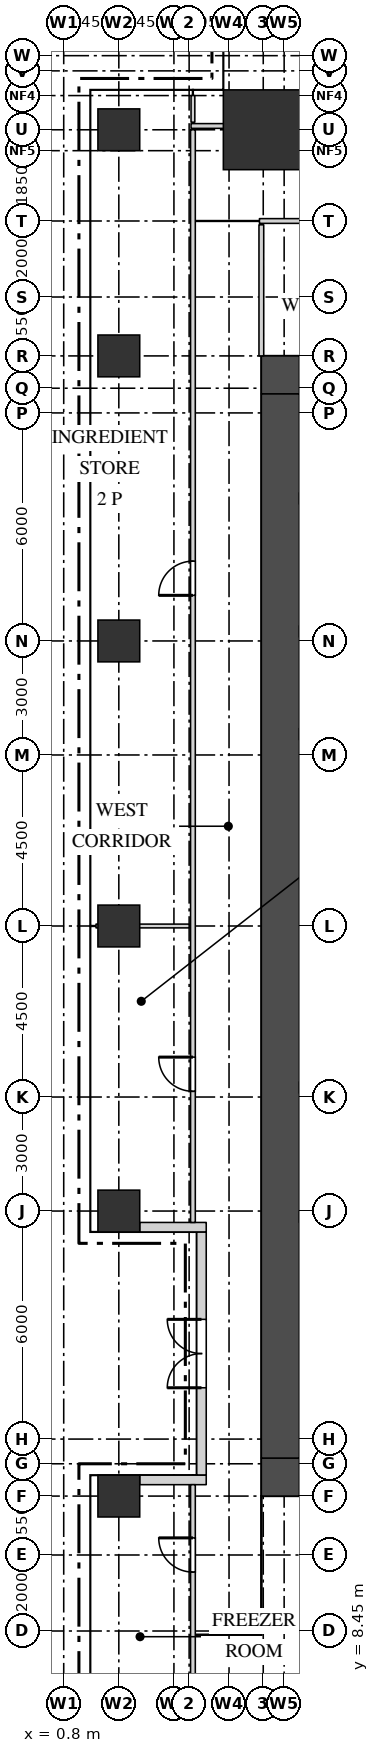
"""IFC4 building model, lengths in metres.
Left out: names, types, materials, properties, quantities, classifications, styles, units other than length and angle.
Written with IfcOpenShell. Run it as: python <this file> out.ifc"""

import sys

from ifc_helpers import new_model, si_unit, direction, frame, frame_2d, origin, origin_2d, place, context, subcontext, project, spatial, rectangle, extrude, source, transform, mapped, element, fill, save


model = new_model("IFC4")
c1 = context("Model", 3, precision=1e-05, world=origin(), true_north=direction((0.0, 1.0)))
c2 = subcontext(c1, "Body", "Model", "MODEL_VIEW")
j1 = project(units=[si_unit("LENGTHUNIT", "METRE"), si_unit("PLANEANGLEUNIT", "RADIAN")], contexts=[c1])
p1 = place(None, origin())
s1 = spatial("IfcSite", under=j1, at=p1, CompositionType="ELEMENT")
p2 = place(p1, origin())
s2 = spatial("IfcBuilding", under=s1, at=p2, CompositionType="ELEMENT")
p3 = place(p2, frame((0.0, 0.0, 114.7)))
s3 = spatial("IfcBuildingStorey", under=s2, at=p3, CompositionType="ELEMENT", Elevation=114.7)
m1 = source(origin(), c2, "Body", "SweptSolid", [
    extrude(rectangle(XDim=1.0, YDim=1.0, at=frame_2d((0.5, 0.0))), origin(), (0.0, 0.0, 1.0), 4.1),
])
for number, where, z_axis, x_axis in (
    (1, (6.0, 41.5, 0.0), (0.0, 0.0, 1.0), (1.0, 0.0, 0.0)),
    (2, (6.0, 12.5, 0.0), (0.0, 0.0, 1.0), (1.0, 0.0, 0.0)),
):
    element("IfcWall", number, at=place(p3, frame(where, z_axis=z_axis, x_axis=x_axis)), inside=s3, PredefinedType="SHEAR", context=c2, shape_type="MappedRepresentation", body=[
        mapped(m1, transform((0.0, 0.0, 0.0))),
    ])
m2 = source(origin(), c2, "Body", "SweptSolid", [
    extrude(rectangle(XDim=28.0, YDim=1.0, at=frame_2d((14.0, 0.0))), origin(), (0.0, 0.0, 1.0), 4.1),
])
p4 = place(p3, frame((6.5, 13.0, 0.0), z_axis=(0.0, 0.0, 1.0), x_axis=(0.0, 1.0, 0.0)))
e3 = element("IfcWall", 3, at=p4, inside=s3, PredefinedType="SHEAR", context=c2, shape_type="MappedRepresentation", body=[
    mapped(m2, transform((0.0, 0.0, 0.0))),
])
m3 = source(origin(), c2, "Body", "SweptSolid", [
    extrude(rectangle(XDim=2.1, YDim=2.1, at=origin_2d()), origin(), (0.0, 0.0, 1.0), 4.4),
])
p5 = place(p3, frame((6.05, 47.95, 0.0), z_axis=(0.0, 0.0, 1.0), x_axis=(1.0, 0.0, 0.0)))
e4 = element("IfcColumn", 4, at=p5, inside=s3, PredefinedType="COLUMN", context=c2, shape_type="MappedRepresentation", body=[
    mapped(m3, transform((0.0, 0.0, 0.0))),
])
m4 = source(origin(), c2, "Body", "SweptSolid", [
    extrude(rectangle(XDim=1.1, YDim=1.1, at=origin_2d()), origin(), (0.0, 0.0, 1.0), 4.1),
])
for number, where, z_axis, x_axis in (
    (5, (2.25, 12.0, 0.0), (0.0, 0.0, 1.0), (1.0, 0.0, 0.0)),
    (6, (2.25, 19.5, 0.0), (0.0, 0.0, 1.0), (1.0, 0.0, 0.0)),
    (7, (2.25, 27.0, 0.0), (0.0, 0.0, 1.0), (1.0, 0.0, 0.0)),
    (8, (2.25, 34.5, 0.0), (0.0, 0.0, 1.0), (1.0, 0.0, 0.0)),
    (9, (2.25, 42.0, 0.0), (0.0, 0.0, 1.0), (1.0, 0.0, 0.0)),
    (10, (2.25, 47.95, 0.0), (0.0, 0.0, 1.0), (1.0, 0.0, 0.0)),
):
    element("IfcColumn", number, at=place(p3, frame(where, z_axis=z_axis, x_axis=x_axis)), inside=s3, PredefinedType="COLUMN", context=c2, shape_type="MappedRepresentation", body=[
        mapped(m4, transform((0.0, 0.0, 0.0))),
    ])
m5 = source(origin(), c2, "Body", "SweptSolid", [
    extrude(rectangle(XDim=6.4, YDim=0.25, at=frame_2d((3.2, 0.0))), origin(), (0.0, 0.0, 1.0), 3.5),
])
p6 = place(p3, frame((4.425, 12.55, 0.0), z_axis=(0.0, 0.0, 1.0), x_axis=(0.0, 1.0, 0.0)))
e11 = element("IfcWall", 11, at=p6, inside=s3, PredefinedType="SOLIDWALL", context=c2, shape_type="MappedRepresentation", body=[
    mapped(m5, transform((0.0, 0.0, 0.0))),
])
m6 = source(origin(), c2, "Body", "SweptSolid", [
    extrude(rectangle(XDim=1.65, YDim=2.4, at=frame_2d((0.825, 1.2))), frame((0.0, 0.135, 0.0), z_axis=(0.0, -1.0, 0.0), x_axis=(1.0, 0.0, 0.0)), (0.0, 0.0, 1.0), 0.27),
])
p7 = place(p6, frame((0.35, 0.0, 0.0)))
e12 = element("IfcOpeningElement", 12, at=p7, cuts=e11, PredefinedType="OPENING", context=c2, shape_type="MappedRepresentation", body=[
    mapped(m6, transform((0.0, 0.0, 0.0))),
])
p8 = place(p6, frame((4.4, 0.0, 0.0)))
e13 = element("IfcOpeningElement", 13, at=p8, cuts=e11, PredefinedType="OPENING", context=c2, shape_type="MappedRepresentation", body=[
    mapped(m6, transform((0.0, 0.0, 0.0))),
])
m7 = source(origin(), c2, "Body", "SweptSolid", [
    extrude(rectangle(XDim=1.8, YDim=2.4, at=frame_2d((0.9, 1.2))), frame((0.0, 0.135, 0.0), z_axis=(0.0, -1.0, 0.0), x_axis=(1.0, 0.0, 0.0)), (0.0, 0.0, 1.0), 0.27),
])
p9 = place(p6, frame((2.3, 0.0, 0.0)))
e14 = element("IfcOpeningElement", 14, at=p9, cuts=e11, PredefinedType="OPENING", context=c2, shape_type="MappedRepresentation", body=[
    mapped(m7, transform((0.0, 0.0, 0.0))),
])
m8 = source(origin(), c2, "Body", "SweptSolid", [
    extrude(rectangle(XDim=1.75, YDim=0.25, at=frame_2d((0.875, 0.0))), origin(), (0.0, 0.0, 1.0), 3.5),
])
for number, where, z_axis, x_axis in (
    (15, (2.8, 12.425, 0.0), (0.0, 0.0, 1.0), (1.0, 0.0, 0.0)),
    (16, (2.8, 19.075, 0.0), (0.0, 0.0, 1.0), (1.0, 0.0, 0.0)),
):
    element("IfcWall", number, at=place(p3, frame(where, z_axis=z_axis, x_axis=x_axis)), inside=s3, PredefinedType="SOLIDWALL", context=c2, shape_type="MappedRepresentation", body=[
        mapped(m8, transform((0.0, 0.0, 0.0))),
    ])
m9 = source(origin(), c2, "Body", "SweptSolid", [
    extrude(rectangle(XDim=6.15, YDim=0.125, at=frame_2d((3.075, 0.0))), origin(), (0.0, 0.0, 1.0), 4.2),
])
p10 = place(p3, frame((4.2, 6.15, 0.0), z_axis=(0.0, 0.0, 1.0), x_axis=(0.0, 1.0, 0.0)))
e17 = element("IfcWall", 17, at=p10, inside=s3, PredefinedType="PARTITIONING", context=c2, shape_type="MappedRepresentation", body=[
    mapped(m9, transform((0.0, 0.0, 0.0))),
])
m10 = source(origin(), c2, "Body", "SweptSolid", [
    extrude(rectangle(XDim=0.9, YDim=2.1, at=frame_2d((0.45, 1.05))), frame((0.0, 0.073, 0.0), z_axis=(0.0, -1.0, 0.0), x_axis=(1.0, 0.0, 0.0)), (0.0, 0.0, 1.0), 0.145),
])
p11 = place(p10, frame((3.85, 0.0, 0.0)))
e18 = element("IfcOpeningElement", 18, at=p11, cuts=e17, PredefinedType="OPENING", context=c2, shape_type="MappedRepresentation", body=[
    mapped(m10, transform((0.0, 0.0, 0.0))),
])
m11 = source(origin(), c2, "Body", "SweptSolid", [
    extrude(rectangle(XDim=28.75, YDim=0.125, at=frame_2d((14.375, 0.0))), origin(), (0.0, 0.0, 1.0), 4.2),
])
p12 = place(p3, frame((4.2, 19.2, 0.0), z_axis=(0.0, 0.0, 1.0), x_axis=(0.0, 1.0, 0.0)))
e19 = element("IfcWall", 19, at=p12, inside=s3, PredefinedType="PARTITIONING", context=c2, shape_type="MappedRepresentation", body=[
    mapped(m11, transform((0.0, 0.0, 0.0))),
])
p13 = place(p12, frame((3.45, 0.0, 0.0)))
e20 = element("IfcOpeningElement", 20, at=p13, cuts=e19, PredefinedType="OPENING", context=c2, shape_type="MappedRepresentation", body=[
    mapped(m10, transform((0.0, 0.0, 0.0))),
])
p14 = place(p12, frame((16.5, 0.0, 0.0)))
e21 = element("IfcOpeningElement", 21, at=p14, cuts=e19, PredefinedType="OPENING", context=c2, shape_type="MappedRepresentation", body=[
    mapped(m10, transform((0.0, 0.0, 0.0))),
])
m12 = source(origin(), c2, "Body", "SweptSolid", [
    extrude(rectangle(XDim=2.45, YDim=0.1, at=frame_2d((1.225, 0.0))), origin(), (0.0, 0.0, 1.0), 4.2),
])
p15 = place(p3, frame((1.65, 27.0, 0.0), z_axis=(0.0, 0.0, 1.0), x_axis=(1.0, 0.0, 0.0)))
e22 = element("IfcWall", 22, at=p15, inside=s3, PredefinedType="PARTITIONING", context=c2, shape_type="MappedRepresentation", body=[
    mapped(m12, transform((0.0, 0.0, 0.0))),
])
m13 = source(origin(), c2, "Body", "SweptSolid", [
    extrude(rectangle(XDim=3.45, YDim=0.125, at=frame_2d((1.725, 0.0))), origin(), (0.0, 0.0, 1.0), 4.2),
])
p16 = place(p3, frame((6.0, 42.0, 0.0), z_axis=(0.0, 0.0, 1.0), x_axis=(0.0, 1.0, 0.0)))
e23 = element("IfcWall", 23, at=p16, inside=s3, PredefinedType="PARTITIONING", context=c2, shape_type="MappedRepresentation", body=[
    mapped(m13, transform((0.0, 0.0, 0.0))),
])
m14 = source(origin(), c2, "Body", "SweptSolid", [
    extrude(rectangle(XDim=7.95, YDim=0.125, at=frame_2d((3.975, 0.0))), origin(), (0.0, 0.0, 1.0), 4.2),
])
p17 = place(p3, frame((5.95, 45.55, 0.0), z_axis=(0.0, 0.0, 1.0), x_axis=(1.0, 0.0, 0.0)))
e24 = element("IfcWall", 24, at=p17, inside=s3, PredefinedType="PARTITIONING", context=c2, shape_type="MappedRepresentation", body=[
    mapped(m14, transform((0.0, 0.0, 0.0))),
])
p18 = place(p17, frame((1.55, 0.0, 0.0)))
e25 = element("IfcOpeningElement", 25, at=p18, cuts=e24, PredefinedType="OPENING", context=c2, shape_type="MappedRepresentation", body=[
    mapped(m10, transform((0.0, 0.0, 0.0))),
])
p19 = place(p17, frame((5.65, 0.0, 0.0)))
e26 = element("IfcOpeningElement", 26, at=p19, cuts=e24, PredefinedType="OPENING", context=c2, shape_type="MappedRepresentation", body=[
    mapped(m10, transform((0.0, 0.0, 0.0))),
])
m15 = source(origin(), c2, "Body", "SweptSolid", [
    extrude(rectangle(XDim=42.2, YDim=0.125, at=frame_2d((21.1, 0.0))), origin(), (0.0, 0.0, 1.0), 3.55),
])
p20 = place(p3, frame((4.15, 48.05, 0.0), z_axis=(0.0, 0.0, 1.0), x_axis=(1.0, 0.0, 0.0)))
e27 = element("IfcWall", 27, at=p20, inside=s3, PredefinedType="PARTITIONING", context=c2, shape_type="MappedRepresentation", body=[
    mapped(m15, transform((0.0, 0.0, 0.0))),
])
p21 = place(p20, frame((7.25, 0.0, 0.0)))
e28 = element("IfcOpeningElement", 28, at=p21, cuts=e27, PredefinedType="OPENING", context=c2, shape_type="MappedRepresentation", body=[
    mapped(m10, transform((0.0, 0.0, 0.0))),
])
p22 = place(p20, frame((22.55, 0.0, 0.0)))
e29 = element("IfcOpeningElement", 29, at=p22, cuts=e27, PredefinedType="OPENING", context=c2, shape_type="MappedRepresentation", body=[
    mapped(m10, transform((0.0, 0.0, 0.0))),
])
p23 = place(p20, frame((35.85, 0.0, 0.0)))
e30 = element("IfcOpeningElement", 30, at=p23, cuts=e27, PredefinedType="OPENING", context=c2, shape_type="MappedRepresentation", body=[
    mapped(m10, transform((0.0, 0.0, 0.0))),
])
m16 = source(origin(), c2, "Body", "SweptSolid", [
    extrude(rectangle(XDim=0.7, YDim=0.1, at=frame_2d((0.35, 0.0))), origin(), (0.0, 0.0, 1.0), 4.2),
])
p24 = place(p3, frame((4.2, 48.15, 0.0), z_axis=(0.0, 0.0, 1.0), x_axis=(0.0, 1.0, 0.0)))
e31 = element("IfcWall", 31, at=p24, inside=s3, PredefinedType="PARTITIONING", context=c2, shape_type="MappedRepresentation", body=[
    mapped(m16, transform((0.0, 0.0, 0.0))),
])
m17 = source(origin(), c2, "Body", "SweptSolid", [
    extrude(rectangle(XDim=1.65, YDim=2.4, at=frame_2d((0.825, 1.2))), frame((0.0, 0.03, 0.0), z_axis=(0.0, -1.0, 0.0), x_axis=(1.0, 0.0, 0.0)), (0.0, 0.0, 1.0), 0.06),
])
p25 = place(p7, origin())
e32 = element("IfcWindow", 32, at=p25, inside=s3, PartitioningType="SINGLE_PANEL", PredefinedType="WINDOW", context=c2, shape_type="MappedRepresentation", body=[
    mapped(m17, transform((0.0, 0.0, 0.0))),
])
fill(e12, e32)
p26 = place(p8, origin())
e33 = element("IfcWindow", 33, at=p26, inside=s3, PartitioningType="SINGLE_PANEL", PredefinedType="WINDOW", context=c2, shape_type="MappedRepresentation", body=[
    mapped(m17, transform((0.0, 0.0, 0.0))),
])
fill(e13, e33)
m18 = source(origin(), c2, "Body", "SweptSolid", [
    extrude(rectangle(XDim=1.8, YDim=2.4, at=frame_2d((0.9, 1.2))), frame((0.0, 0.025, 0.0), z_axis=(0.0, -1.0, 0.0), x_axis=(1.0, 0.0, 0.0)), (0.0, 0.0, 1.0), 0.05),
])
p27 = place(p9, origin())
e34 = element("IfcDoor", 34, at=p27, inside=s3, OperationType="DOUBLE_DOOR_DOUBLE_SWING", PredefinedType="DOOR", context=c2, shape_type="MappedRepresentation", body=[
    mapped(m18, transform((0.0, 0.0, 0.0))),
])
fill(e14, e34)
m19 = source(origin(), c2, "Body", "SweptSolid", [
    extrude(rectangle(XDim=0.9, YDim=2.1, at=frame_2d((0.45, 1.05))), frame((0.0, 0.025, 0.0), z_axis=(0.0, -1.0, 0.0), x_axis=(1.0, 0.0, 0.0)), (0.0, 0.0, 1.0), 0.05),
])
p28 = place(p11, origin())
e35 = element("IfcDoor", 35, at=p28, inside=s3, OperationType="SINGLE_SWING_LEFT", PredefinedType="DOOR", context=c2, shape_type="MappedRepresentation", body=[
    mapped(m19, transform((0.0, 0.0, 0.0))),
])
fill(e18, e35)
p29 = place(p13, origin())
e36 = element("IfcDoor", 36, at=p29, inside=s3, OperationType="SINGLE_SWING_LEFT", PredefinedType="DOOR", context=c2, shape_type="MappedRepresentation", body=[
    mapped(m19, transform((0.0, 0.0, 0.0))),
])
fill(e20, e36)
p30 = place(p14, origin())
e37 = element("IfcDoor", 37, at=p30, inside=s3, OperationType="SINGLE_SWING_RIGHT", PredefinedType="DOOR", context=c2, shape_type="MappedRepresentation", body=[
    mapped(m19, transform((0.0, 0.0, 0.0))),
])
fill(e21, e37)
save(model, sys.argv[1])
